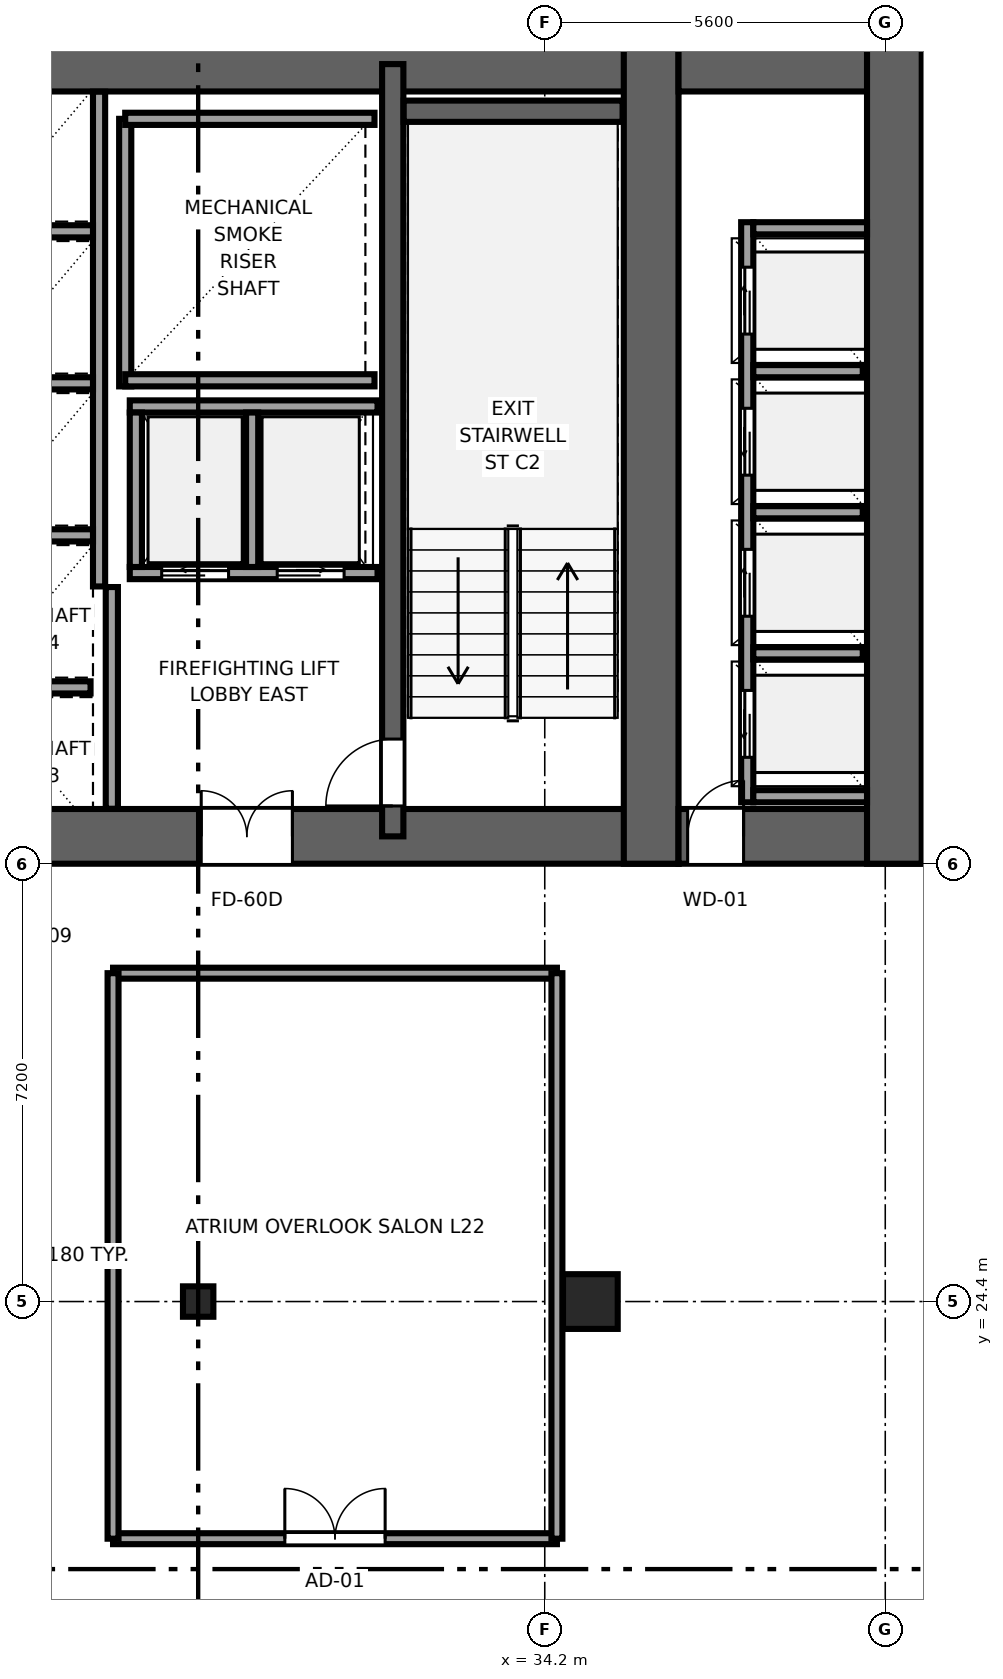
"""IFC4 building model, lengths in metres.
Left out: names, types, materials, properties, quantities, classifications, styles, units other than length and angle.
Written with IfcOpenShell. Run it as: python <this file> out.ifc"""

import sys

from ifc_helpers import new_model, si_unit, direction, frame, frame_2d, origin, origin_2d, place, context, subcontext, project, spatial, rectangle, i_section, extrude, source, transform, mapped, element, fill, save


model = new_model("IFC4")
c1 = context("Model", 3, precision=1e-05, world=origin(), true_north=direction((0.0, 1.0)))
c2 = subcontext(c1, "Body", "Model", "MODEL_VIEW")
j1 = project(units=[si_unit("LENGTHUNIT", "METRE"), si_unit("PLANEANGLEUNIT", "RADIAN")], contexts=[c1])
p1 = place(None, origin())
s1 = spatial("IfcSite", under=j1, at=p1, CompositionType="ELEMENT")
p2 = place(p1, origin())
s2 = spatial("IfcBuilding", under=s1, at=p2, CompositionType="ELEMENT")
p3 = place(p2, frame((0.0, 0.0, 88.8)))
s3 = spatial("IfcBuildingStorey", under=s2, at=p3, CompositionType="ELEMENT", Elevation=88.8)
p4 = place(p3, frame((9.6, 32.05, 0.0), z_axis=(0.0, 0.0, 1.0), x_axis=(1.0, 0.0, 0.0)))
e1 = element("IfcWall", 1, at=p4, inside=s3, PredefinedType="SHEAR", context=c2, shape_type="SweptSolid", body=[
    extrude(rectangle(XDim=26.8, YDim=0.9, at=frame_2d((13.4, 0.0))), origin(), (0.0, 0.0, 1.0), 3.55),
])
p5 = place(p4, frame((6.52, 0.0, 0.0), z_axis=(0.0, 0.0, 1.0), x_axis=(-1.0, 0.0, 0.0)))
e2 = element("IfcOpeningElement", 2, at=p5, cuts=e1, PredefinedType="OPENING", context=c2, shape_type="SweptSolid", body=[
    extrude(rectangle(XDim=1.5, YDim=2.04, at=frame_2d((0.75, 1.02))), frame((0.0, 0.46, 0.0), z_axis=(0.0, -1.0, 0.0), x_axis=(1.0, 0.0, 0.0)), (0.0, 0.0, 1.0), 0.92),
])
p6 = place(p4, frame((14.15, 0.0, 0.0), z_axis=(0.0, 0.0, 1.0), x_axis=(-1.0, 0.0, 0.0)))
e3 = element("IfcOpeningElement", 3, at=p6, cuts=e1, PredefinedType="OPENING", context=c2, shape_type="SweptSolid", body=[
    extrude(rectangle(XDim=1.5, YDim=2.04, at=frame_2d((0.75, 1.02))), frame((0.0, 0.46, 0.0), z_axis=(0.0, -1.0, 0.0), x_axis=(1.0, 0.0, 0.0)), (0.0, 0.0, 1.0), 0.92),
])
p7 = place(p4, frame((20.45, 0.0, 0.0), z_axis=(0.0, 0.0, 1.0), x_axis=(-1.0, 0.0, 0.0)))
e4 = element("IfcOpeningElement", 4, at=p7, cuts=e1, PredefinedType="OPENING", context=c2, shape_type="SweptSolid", body=[
    extrude(rectangle(XDim=1.5, YDim=2.04, at=frame_2d((0.75, 1.02))), frame((0.0, 0.46, 0.0), z_axis=(0.0, -1.0, 0.0), x_axis=(1.0, 0.0, 0.0)), (0.0, 0.0, 1.0), 0.92),
])
p8 = place(p4, frame((8.57, 0.0, 0.0), z_axis=(0.0, 0.0, 1.0), x_axis=(-1.0, 0.0, 0.0)))
e5 = element("IfcOpeningElement", 5, at=p8, cuts=e1, PredefinedType="OPENING", context=c2, shape_type="SweptSolid", body=[
    extrude(rectangle(XDim=0.82, YDim=2.01, at=frame_2d((0.41, 1.005))), frame((0.0, 0.46, 0.0), z_axis=(0.0, -1.0, 0.0), x_axis=(1.0, 0.0, 0.0)), (0.0, 0.0, 1.0), 0.92),
])
p9 = place(p3, frame((9.6, 44.75, 0.0), z_axis=(0.0, 0.0, 1.0), x_axis=(1.0, 0.0, 0.0)))
e6 = element("IfcWall", 6, at=p9, inside=s3, PredefinedType="SHEAR", context=c2, shape_type="SweptSolid", body=[
    extrude(rectangle(XDim=26.8, YDim=0.9, at=frame_2d((13.4, 0.0))), origin(), (0.0, 0.0, 1.0), 3.55),
])
p10 = place(p3, frame((35.95, 31.6, 0.0), z_axis=(0.0, 0.0, 1.0), x_axis=(0.0, 1.0, 0.0)))
e7 = element("IfcWall", 7, at=p10, inside=s3, PredefinedType="SHEAR", context=c2, shape_type="SweptSolid", body=[
    extrude(rectangle(XDim=13.6, YDim=0.9, at=frame_2d((6.8, 0.0))), origin(), (0.0, 0.0, 1.0), 3.55),
])
p11 = place(p3, frame((31.7, 32.05, 0.0), z_axis=(0.0, 0.0, 1.0), x_axis=(0.0, 1.0, 0.0)))
e8 = element("IfcWall", 8, at=p11, inside=s3, PredefinedType="SHEAR", context=c2, shape_type="SweptSolid", body=[
    extrude(rectangle(XDim=12.7, YDim=0.35, at=frame_2d((6.35, 0.0))), origin(), (0.0, 0.0, 1.0), 3.55),
])
p12 = place(p11, frame((1.6, 0.0, 0.0), z_axis=(0.0, 0.0, 1.0), x_axis=(-1.0, 0.0, 0.0)))
e9 = element("IfcOpeningElement", 9, at=p12, cuts=e8, PredefinedType="OPENING", context=c2, shape_type="SweptSolid", body=[
    extrude(rectangle(XDim=1.1, YDim=2.12, at=frame_2d((0.55, 1.06))), frame((0.0, 0.185, 0.0), z_axis=(0.0, -1.0, 0.0), x_axis=(1.0, 0.0, 0.0)), (0.0, 0.0, 1.0), 0.37),
])
p13 = place(p3, frame((36.4, 32.05, 0.0), z_axis=(0.0, 0.0, 1.0), x_axis=(1.0, 0.0, 0.0)))
e10 = element("IfcWall", 10, at=p13, inside=s3, PredefinedType="SHEAR", context=c2, shape_type="SweptSolid", body=[
    extrude(rectangle(XDim=4.0, YDim=0.9, at=frame_2d((2.0, 0.0))), origin(), (0.0, 0.0, 1.0), 3.55),
])
p14 = place(p13, frame((1.07, 0.0, 0.0), z_axis=(0.0, 0.0, 1.0), x_axis=(-1.0, 0.0, 0.0)))
e11 = element("IfcOpeningElement", 11, at=p14, cuts=e10, PredefinedType="OPENING", context=c2, shape_type="SweptSolid", body=[
    extrude(rectangle(XDim=0.92, YDim=2.01, at=frame_2d((0.46, 1.005))), frame((0.0, 0.46, 0.0), z_axis=(0.0, -1.0, 0.0), x_axis=(1.0, 0.0, 0.0)), (0.0, 0.0, 1.0), 0.92),
])
p15 = place(p3, frame((36.4, 44.75, 0.0), z_axis=(0.0, 0.0, 1.0), x_axis=(1.0, 0.0, 0.0)))
e12 = element("IfcWall", 12, at=p15, inside=s3, PredefinedType="SHEAR", context=c2, shape_type="SweptSolid", body=[
    extrude(rectangle(XDim=4.0, YDim=0.9, at=frame_2d((2.0, 0.0))), origin(), (0.0, 0.0, 1.0), 3.55),
])
p16 = place(p3, frame((39.95, 31.6, 0.0), z_axis=(0.0, 0.0, 1.0), x_axis=(0.0, 1.0, 0.0)))
e13 = element("IfcWall", 13, at=p16, inside=s3, PredefinedType="SHEAR", context=c2, shape_type="SweptSolid", body=[
    extrude(rectangle(XDim=13.6, YDim=0.9, at=frame_2d((6.8, 0.0))), origin(), (0.0, 0.0, 1.0), 3.55),
])
p17 = place(p3, frame((31.88, 43.975, 0.0), z_axis=(0.0, 0.0, 1.0), x_axis=(1.0, 0.0, 0.0)))
e14 = element("IfcWall", 14, at=p17, inside=s3, PredefinedType="SHEAR", context=c2, shape_type="SweptSolid", body=[
    extrude(rectangle(XDim=3.6, YDim=0.35, at=frame_2d((1.8, 0.0))), origin(), (0.0, 0.0, 1.0), 3.55),
])
m1 = source(origin(), c2, "Body", "SweptSolid", [
    extrude(rectangle(XDim=0.9, YDim=0.9, at=origin_2d()), origin(), (0.0, 0.0, 1.0), 3.55),
])
p18 = place(p3, frame((34.95, 24.4, 0.0), z_axis=(0.0, 0.0, 1.0), x_axis=(1.0, 0.0, 0.0)))
e15 = element("IfcColumn", 15, at=p18, inside=s3, PredefinedType="COLUMN", context=c2, shape_type="MappedRepresentation", body=[
    mapped(m1, transform((0.0, 0.0, 0.0), x_axis=(1.0, 0.0, 0.0), y_axis=(0.0, 1.0, 0.0), z_axis=(0.0, 0.0, 1.0), scale=1.0)),
])
m2 = source(origin(), c2, "Body", "SweptSolid", [
    extrude(i_section(OverallWidth=0.5, OverallDepth=0.5, WebThickness=0.022, FlangeThickness=0.034, at=origin_2d()), origin(), (0.0, 0.0, 1.0), 3.55),
])
p19 = place(p3, frame((28.5, 24.4, 0.0), z_axis=(0.0, 0.0, 1.0), x_axis=(1.0, 0.0, 0.0)))
e16 = element("IfcColumn", 16, at=p19, inside=s3, PredefinedType="COLUMN", context=c2, shape_type="MappedRepresentation", body=[
    mapped(m2, transform((0.0, 0.0, 0.0), x_axis=(1.0, 0.0, 0.0), y_axis=(0.0, 1.0, 0.0), z_axis=(0.0, 0.0, 1.0), scale=1.0)),
])
p20 = place(p3, frame((27.3, 39.45, 0.0), z_axis=(0.0, 0.0, 1.0), x_axis=(0.0, 1.0, 0.0)))
e17 = element("IfcWall", 17, at=p20, inside=s3, PredefinedType="SOLIDWALL", context=c2, shape_type="SweptSolid", body=[
    extrude(rectangle(XDim=4.4, YDim=0.2, at=frame_2d((2.2, 0.0))), origin(), (0.0, 0.0, 1.0), 3.37),
])
for number, where, z_axis, x_axis in (
    (18, (27.3, 39.55, 0.0), (0.0, 0.0, 1.0), (1.0, 0.0, 0.0)),
    (19, (27.3, 43.85, 0.0), (0.0, 0.0, 1.0), (1.0, 0.0, 0.0)),
):
    element("IfcWall", number, at=place(p3, frame(where, z_axis=z_axis, x_axis=x_axis)), inside=s3, PredefinedType="SOLIDWALL", context=c2, shape_type="SweptSolid", body=[
        extrude(rectangle(XDim=4.1, YDim=0.2, at=frame_2d((2.05, 0.0))), origin(), (0.0, 0.0, 1.0), 3.37),
    ])
p21 = place(p3, frame((27.08, 32.504, 0.0), z_axis=(0.0, 0.0, 1.0), x_axis=(0.0, 1.0, 0.0)))
e20 = element("IfcWall", 20, at=p21, inside=s3, PredefinedType="SOLIDWALL", context=c2, shape_type="SweptSolid", body=[
    extrude(rectangle(XDim=3.646, YDim=0.2, at=frame_2d((1.823, 0.0))), origin(), (0.0, 0.0, 1.0), 3.37),
])
p22 = place(p3, frame((27.375, 36.38, 0.0), z_axis=(0.0, 0.0, 1.0), x_axis=(1.0, 0.0, 0.0)))
e21 = element("IfcWall", 21, at=p22, inside=s3, PredefinedType="SOLIDWALL", context=c2, shape_type="SweptSolid", body=[
    extrude(rectangle(XDim=4.075, YDim=0.2, at=frame_2d((2.038, 0.0))), origin(), (0.0, 0.0, 1.0), 3.37),
])
p23 = place(p22, frame((0.525, 0.0, 0.0)))
e22 = element("IfcOpeningElement", 22, at=p23, cuts=e21, PredefinedType="OPENING", context=c2, shape_type="SweptSolid", body=[
    extrude(rectangle(XDim=1.1, YDim=2.12, at=frame_2d((0.55, 1.06))), frame((0.0, 0.11, 0.0), z_axis=(0.0, -1.0, 0.0), x_axis=(1.0, 0.0, 0.0)), (0.0, 0.0, 1.0), 0.22),
])
p24 = place(p22, frame((2.425, 0.0, 0.0)))
e23 = element("IfcOpeningElement", 23, at=p24, cuts=e21, PredefinedType="OPENING", context=c2, shape_type="SweptSolid", body=[
    extrude(rectangle(XDim=1.1, YDim=2.12, at=frame_2d((0.55, 1.06))), frame((0.0, 0.11, 0.0), z_axis=(0.0, -1.0, 0.0), x_axis=(1.0, 0.0, 0.0)), (0.0, 0.0, 1.0), 0.22),
])
p25 = place(p3, frame((27.375, 39.12, 0.0), z_axis=(0.0, 0.0, 1.0), x_axis=(1.0, 0.0, 0.0)))
e24 = element("IfcWall", 24, at=p25, inside=s3, PredefinedType="SOLIDWALL", context=c2, shape_type="SweptSolid", body=[
    extrude(rectangle(XDim=4.075, YDim=0.2, at=frame_2d((2.038, 0.0))), origin(), (0.0, 0.0, 1.0), 3.37),
])
for number, where, z_axis, x_axis in (
    (25, (27.475, 36.48, 0.0), (0.0, 0.0, 1.0), (0.0, 1.0, 0.0)),
    (26, (29.387, 36.48, 0.0), (0.0, 0.0, 1.0), (0.0, 1.0, 0.0)),
):
    element("IfcWall", number, at=place(p3, frame(where, z_axis=z_axis, x_axis=x_axis)), inside=s3, PredefinedType="SOLIDWALL", context=c2, shape_type="SweptSolid", body=[
        extrude(rectangle(XDim=2.54, YDim=0.2, at=frame_2d((1.27, 0.0))), origin(), (0.0, 0.0, 1.0), 3.37),
    ])
p26 = place(p3, frame((26.87, 36.16, 0.0), z_axis=(0.0, 0.0, 1.0), x_axis=(0.0, 1.0, 0.0)))
e27 = element("IfcWall", 27, at=p26, inside=s3, PredefinedType="SOLIDWALL", context=c2, shape_type="SweptSolid", body=[
    extrude(rectangle(XDim=8.136, YDim=0.2, at=frame_2d((4.068, 0.0))), origin(), (0.0, 0.0, 1.0), 3.37),
])
p27 = place(p3, frame((24.93, 34.5, 0.0), z_axis=(0.0, 0.0, 1.0), x_axis=(1.0, 0.0, 0.0)))
e28 = element("IfcWall", 28, at=p27, inside=s3, PredefinedType="SOLIDWALL", context=c2, shape_type="SweptSolid", body=[
    extrude(rectangle(XDim=1.8, YDim=0.2, at=frame_2d((0.9, 0.0))), origin(), (0.0, 0.0, 1.0), 3.37),
])
for number, where, z_axis, x_axis in (
    (29, (24.93, 37.0, 0.0), (0.0, 0.0, 1.0), (1.0, 0.0, 0.0)),
    (30, (24.93, 39.5, 0.0), (0.0, 0.0, 1.0), (1.0, 0.0, 0.0)),
    (31, (24.93, 42.0, 0.0), (0.0, 0.0, 1.0), (1.0, 0.0, 0.0)),
):
    element("IfcWall", number, at=place(p3, frame(where, z_axis=z_axis, x_axis=x_axis)), inside=s3, PredefinedType="SOLIDWALL", context=c2, shape_type="SweptSolid", body=[
        extrude(rectangle(XDim=1.84, YDim=0.2, at=frame_2d((0.92, 0.0))), origin(), (0.0, 0.0, 1.0), 3.37),
    ])
p28 = place(p3, frame((37.53, 32.61, 0.0), z_axis=(0.0, 0.0, 1.0), x_axis=(0.0, 1.0, 0.0)))
e32 = element("IfcWall", 32, at=p28, inside=s3, PredefinedType="SOLIDWALL", context=c2, shape_type="SweptSolid", body=[
    extrude(rectangle(XDim=9.54, YDim=0.2, at=frame_2d((4.77, 0.0))), origin(), (0.0, 0.0, 1.0), 3.37),
])
p29 = place(p28, frame((0.74, 0.0, 0.0)))
e33 = element("IfcOpeningElement", 33, at=p29, cuts=e32, PredefinedType="OPENING", context=c2, shape_type="SweptSolid", body=[
    extrude(rectangle(XDim=1.1, YDim=2.12, at=frame_2d((0.55, 1.06))), frame((0.0, 0.11, 0.0), z_axis=(0.0, -1.0, 0.0), x_axis=(1.0, 0.0, 0.0)), (0.0, 0.0, 1.0), 0.22),
])
p30 = place(p28, frame((3.06, 0.0, 0.0)))
e34 = element("IfcOpeningElement", 34, at=p30, cuts=e32, PredefinedType="OPENING", context=c2, shape_type="SweptSolid", body=[
    extrude(rectangle(XDim=1.1, YDim=2.12, at=frame_2d((0.55, 1.06))), frame((0.0, 0.11, 0.0), z_axis=(0.0, -1.0, 0.0), x_axis=(1.0, 0.0, 0.0)), (0.0, 0.0, 1.0), 0.22),
])
p31 = place(p28, frame((5.38, 0.0, 0.0)))
e35 = element("IfcOpeningElement", 35, at=p31, cuts=e32, PredefinedType="OPENING", context=c2, shape_type="SweptSolid", body=[
    extrude(rectangle(XDim=1.1, YDim=2.12, at=frame_2d((0.55, 1.06))), frame((0.0, 0.11, 0.0), z_axis=(0.0, -1.0, 0.0), x_axis=(1.0, 0.0, 0.0)), (0.0, 0.0, 1.0), 0.22),
])
p32 = place(p28, frame((7.7, 0.0, 0.0)))
e36 = element("IfcOpeningElement", 36, at=p32, cuts=e32, PredefinedType="OPENING", context=c2, shape_type="SweptSolid", body=[
    extrude(rectangle(XDim=1.1, YDim=2.12, at=frame_2d((0.55, 1.06))), frame((0.0, 0.11, 0.0), z_axis=(0.0, -1.0, 0.0), x_axis=(1.0, 0.0, 0.0)), (0.0, 0.0, 1.0), 0.22),
])
for number, where, z_axis, x_axis in (
    (37, (37.63, 32.71, 0.0), (0.0, 0.0, 1.0), (1.0, 0.0, 0.0)),
    (38, (37.63, 42.05, 0.0), (0.0, 0.0, 1.0), (1.0, 0.0, 0.0)),
):
    element("IfcWall", number, at=place(p3, frame(where, z_axis=z_axis, x_axis=x_axis)), inside=s3, PredefinedType="SOLIDWALL", context=c2, shape_type="SweptSolid", body=[
        extrude(rectangle(XDim=1.87, YDim=0.2, at=frame_2d((0.935, 0.0))), origin(), (0.0, 0.0, 1.0), 3.37),
    ])
for number, where, z_axis, x_axis in (
    (39, (37.63, 35.06, 0.0), (0.0, 0.0, 1.0), (1.0, 0.0, 0.0)),
    (40, (37.63, 37.38, 0.0), (0.0, 0.0, 1.0), (1.0, 0.0, 0.0)),
    (41, (37.63, 39.7, 0.0), (0.0, 0.0, 1.0), (1.0, 0.0, 0.0)),
):
    element("IfcWall", number, at=place(p3, frame(where, z_axis=z_axis, x_axis=x_axis)), inside=s3, PredefinedType="SOLIDWALL", context=c2, shape_type="SweptSolid", body=[
        extrude(rectangle(XDim=1.8, YDim=0.2, at=frame_2d((0.9, 0.0))), origin(), (0.0, 0.0, 1.0), 3.37),
    ])
p33 = place(p3, frame((27.1, 20.5, 0.0), z_axis=(0.0, 0.0, 1.0), x_axis=(1.0, 0.0, 0.0)))
e42 = element("IfcWall", 42, at=p33, inside=s3, PredefinedType="PARTITIONING", context=c2, shape_type="SweptSolid", body=[
    extrude(rectangle(XDim=7.3, YDim=0.18, at=frame_2d((3.65, 0.0))), origin(), (0.0, 0.0, 1.0), 3.37),
])
p34 = place(p33, frame((2.825, 0.0, 0.0)))
e43 = element("IfcOpeningElement", 43, at=p34, cuts=e42, PredefinedType="OPENING", context=c2, shape_type="SweptSolid", body=[
    extrude(rectangle(XDim=1.65, YDim=2.15, at=frame_2d((0.825, 1.075))), frame((0.0, 0.1, 0.0), z_axis=(0.0, -1.0, 0.0), x_axis=(1.0, 0.0, 0.0)), (0.0, 0.0, 1.0), 0.2),
])
p35 = place(p3, frame((27.1, 29.8, 0.0), z_axis=(0.0, 0.0, 1.0), x_axis=(1.0, 0.0, 0.0)))
e44 = element("IfcWall", 44, at=p35, inside=s3, PredefinedType="PARTITIONING", context=c2, shape_type="SweptSolid", body=[
    extrude(rectangle(XDim=7.3, YDim=0.18, at=frame_2d((3.65, 0.0))), origin(), (0.0, 0.0, 1.0), 3.37),
])
for number, where, z_axis, x_axis in (
    (45, (27.1, 20.5, 0.0), (0.0, 0.0, 1.0), (0.0, 1.0, 0.0)),
    (46, (34.4, 20.5, 0.0), (0.0, 0.0, 1.0), (0.0, 1.0, 0.0)),
):
    element("IfcWall", number, at=place(p3, frame(where, z_axis=z_axis, x_axis=x_axis)), inside=s3, PredefinedType="PARTITIONING", context=c2, shape_type="SweptSolid", body=[
        extrude(rectangle(XDim=9.3, YDim=0.18, at=frame_2d((4.65, 0.0))), origin(), (0.0, 0.0, 1.0), 3.37),
    ])
m3 = source(origin(), c2, "Body", "SweptSolid", [
    extrude(rectangle(XDim=1.1, YDim=2.12, at=frame_2d((0.55, 1.06))), frame((0.0, 0.025, 0.0), z_axis=(0.0, -1.0, 0.0), x_axis=(1.0, 0.0, 0.0)), (0.0, 0.0, 1.0), 0.05),
])
p36 = place(p12, origin())
e47 = element("IfcDoor", 47, at=p36, inside=s3, OperationType="SINGLE_SWING_LEFT", PredefinedType="DOOR", context=c2, shape_type="MappedRepresentation", body=[
    mapped(m3, transform((0.0, 0.0, 0.0), x_axis=(1.0, 0.0, 0.0), y_axis=(0.0, 1.0, 0.0), z_axis=(0.0, 0.0, 1.0), scale=1.0)),
])
fill(e9, e47)
m4 = source(origin(), c2, "Body", "SweptSolid", [
    extrude(rectangle(XDim=1.5, YDim=2.04, at=frame_2d((0.75, 1.02))), frame((0.0, 0.025, 0.0), z_axis=(0.0, -1.0, 0.0), x_axis=(1.0, 0.0, 0.0)), (0.0, 0.0, 1.0), 0.05),
])
p37 = place(p7, origin())
e48 = element("IfcDoor", 48, at=p37, inside=s3, OperationType="DOUBLE_DOOR_SINGLE_SWING", PredefinedType="DOOR", context=c2, shape_type="MappedRepresentation", body=[
    mapped(m4, transform((0.0, 0.0, 0.0), x_axis=(1.0, 0.0, 0.0), y_axis=(0.0, 1.0, 0.0), z_axis=(0.0, 0.0, 1.0), scale=1.0)),
])
fill(e4, e48)
m5 = source(origin(), c2, "Body", "SweptSolid", [
    extrude(rectangle(XDim=0.92, YDim=2.01, at=frame_2d((0.46, 1.005))), frame((0.0, 0.025, 0.0), z_axis=(0.0, -1.0, 0.0), x_axis=(1.0, 0.0, 0.0)), (0.0, 0.0, 1.0), 0.05),
])
p38 = place(p14, origin())
e49 = element("IfcDoor", 49, at=p38, inside=s3, OperationType="SINGLE_SWING_RIGHT", PredefinedType="DOOR", context=c2, shape_type="MappedRepresentation", body=[
    mapped(m5, transform((0.0, 0.0, 0.0), x_axis=(1.0, 0.0, 0.0), y_axis=(0.0, 1.0, 0.0), z_axis=(0.0, 0.0, 1.0), scale=1.0)),
])
fill(e11, e49)
m6 = source(origin(), c2, "Body", "SweptSolid", [
    extrude(rectangle(XDim=1.1, YDim=2.12, at=frame_2d((0.55, 1.06))), frame((0.0, 0.025, 0.0), z_axis=(0.0, -1.0, 0.0), x_axis=(1.0, 0.0, 0.0)), (0.0, 0.0, 1.0), 0.05),
])
p39 = place(p23, origin())
e50 = element("IfcDoor", 50, at=p39, inside=s3, OperationType="SLIDING_TO_LEFT", PredefinedType="DOOR", context=c2, shape_type="MappedRepresentation", body=[
    mapped(m6, transform((0.0, 0.0, 0.0), x_axis=(1.0, 0.0, 0.0), y_axis=(0.0, 1.0, 0.0), z_axis=(0.0, 0.0, 1.0), scale=1.0)),
])
fill(e22, e50)
p40 = place(p24, origin())
e51 = element("IfcDoor", 51, at=p40, inside=s3, OperationType="SLIDING_TO_RIGHT", PredefinedType="DOOR", context=c2, shape_type="MappedRepresentation", body=[
    mapped(m6, transform((0.0, 0.0, 0.0), x_axis=(1.0, 0.0, 0.0), y_axis=(0.0, 1.0, 0.0), z_axis=(0.0, 0.0, 1.0), scale=1.0)),
])
fill(e23, e51)
p41 = place(p29, origin())
e52 = element("IfcDoor", 52, at=p41, inside=s3, OperationType="SLIDING_TO_LEFT", PredefinedType="DOOR", context=c2, shape_type="MappedRepresentation", body=[
    mapped(m6, transform((0.0, 0.0, 0.0), x_axis=(1.0, 0.0, 0.0), y_axis=(0.0, 1.0, 0.0), z_axis=(0.0, 0.0, 1.0), scale=1.0)),
])
fill(e33, e52)
p42 = place(p30, origin())
e53 = element("IfcDoor", 53, at=p42, inside=s3, OperationType="SLIDING_TO_RIGHT", PredefinedType="DOOR", context=c2, shape_type="MappedRepresentation", body=[
    mapped(m6, transform((0.0, 0.0, 0.0), x_axis=(1.0, 0.0, 0.0), y_axis=(0.0, 1.0, 0.0), z_axis=(0.0, 0.0, 1.0), scale=1.0)),
])
fill(e34, e53)
p43 = place(p31, origin())
e54 = element("IfcDoor", 54, at=p43, inside=s3, OperationType="SLIDING_TO_LEFT", PredefinedType="DOOR", context=c2, shape_type="MappedRepresentation", body=[
    mapped(m6, transform((0.0, 0.0, 0.0), x_axis=(1.0, 0.0, 0.0), y_axis=(0.0, 1.0, 0.0), z_axis=(0.0, 0.0, 1.0), scale=1.0)),
])
fill(e35, e54)
p44 = place(p32, origin())
e55 = element("IfcDoor", 55, at=p44, inside=s3, OperationType="SLIDING_TO_RIGHT", PredefinedType="DOOR", context=c2, shape_type="MappedRepresentation", body=[
    mapped(m6, transform((0.0, 0.0, 0.0), x_axis=(1.0, 0.0, 0.0), y_axis=(0.0, 1.0, 0.0), z_axis=(0.0, 0.0, 1.0), scale=1.0)),
])
fill(e36, e55)
m7 = source(origin(), c2, "Body", "SweptSolid", [
    extrude(rectangle(XDim=1.65, YDim=2.15, at=frame_2d((0.825, 1.075))), frame((0.0, 0.025, 0.0), z_axis=(0.0, -1.0, 0.0), x_axis=(1.0, 0.0, 0.0)), (0.0, 0.0, 1.0), 0.05),
])
p45 = place(p34, origin())
e56 = element("IfcDoor", 56, at=p45, inside=s3, OperationType="DOUBLE_DOOR_SINGLE_SWING", PredefinedType="DOOR", context=c2, shape_type="MappedRepresentation", body=[
    mapped(m7, transform((0.0, 0.0, 0.0), x_axis=(1.0, 0.0, 0.0), y_axis=(0.0, 1.0, 0.0), z_axis=(0.0, 0.0, 1.0), scale=1.0)),
])
fill(e43, e56)
save(model, sys.argv[1])
